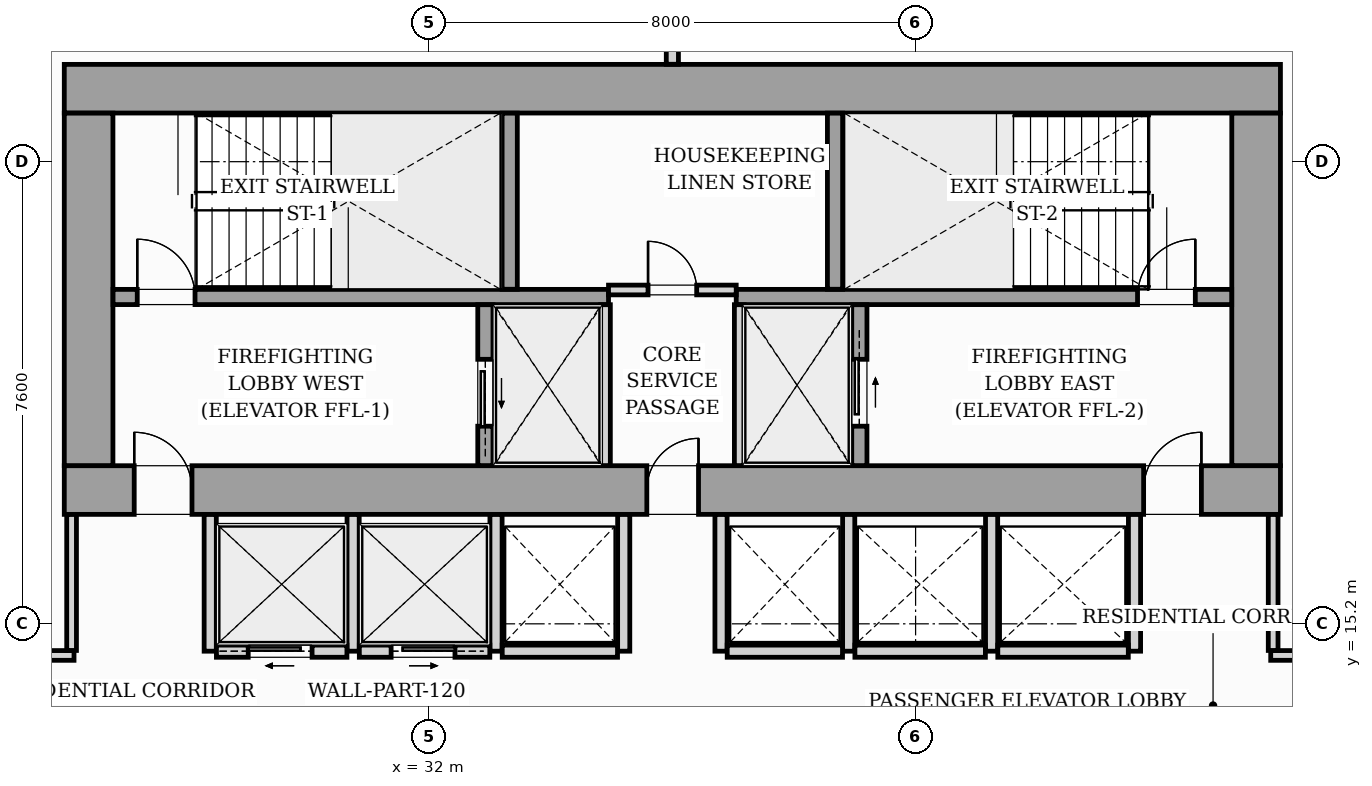
"""IFC4 building model, lengths in metres.
Left out: names, types, materials, properties, quantities, classifications, styles, units other than length and angle.
Written with IfcOpenShell. Run it as: python <this file> out.ifc"""

import sys

from ifc_helpers import new_model, si_unit, direction, frame, frame_2d, origin, origin_2d, place, context, subcontext, project, spatial, rectangle, i_section, extrude, source, transform, mapped, element, fill, save


model = new_model("IFC4")
c1 = context("Model", 3, precision=1e-05, world=origin(), true_north=direction((0.0, 1.0)))
c2 = subcontext(c1, "Body", "Model", "MODEL_VIEW")
j1 = project(units=[si_unit("LENGTHUNIT", "METRE"), si_unit("PLANEANGLEUNIT", "RADIAN")], contexts=[c1])
p1 = place(None, origin())
s1 = spatial("IfcSite", under=j1, at=p1, CompositionType="ELEMENT")
p2 = place(p1, origin())
s2 = spatial("IfcBuilding", under=s1, at=p2, CompositionType="ELEMENT")
p3 = place(p2, frame((0.0, 0.0, 51.8)))
s3 = spatial("IfcBuildingStorey", under=s2, at=p3, CompositionType="ELEMENT", Elevation=51.8)
m1 = source(origin(), c2, "Body", "SweptSolid", [
    extrude(i_section(OverallWidth=0.437, OverallDepth=0.514, WebThickness=0.061, FlangeThickness=0.097, FilletRadius=0.018, at=origin_2d()), origin(), (0.0, 0.0, 1.0), 3.196),
])
for number, where, z_axis, x_axis in (
    (1, (26.4, 17.4, 0.002), (0.0, 0.0, 1.0), (1.0, 0.0, 0.0)),
    (2, (33.12, 17.4, 0.002), (0.0, 0.0, 1.0), (1.0, 0.0, 0.0)),
    (3, (38.88, 17.4, 0.002), (0.0, 0.0, 1.0), (1.0, 0.0, 0.0)),
    (4, (45.6, 17.4, 0.002), (0.0, 0.0, 1.0), (1.0, 0.0, 0.0)),
    (5, (26.4, 24.0, 0.002), (0.0, 0.0, 1.0), (1.0, 0.0, 0.0)),
    (6, (33.12, 24.0, 0.002), (0.0, 0.0, 1.0), (1.0, 0.0, 0.0)),
    (7, (38.88, 24.0, 0.002), (0.0, 0.0, 1.0), (1.0, 0.0, 0.0)),
    (8, (45.6, 24.0, 0.002), (0.0, 0.0, 1.0), (1.0, 0.0, 0.0)),
):
    element("IfcColumn", number, at=place(p3, frame(where, z_axis=z_axis, x_axis=x_axis)), inside=s3, PredefinedType="PILASTER", context=c2, shape_type="MappedRepresentation", body=[
        mapped(m1, transform((0.0, 0.0, 0.0), scale=1.0)),
    ])
p4 = place(p3, frame((26.0, 17.4, 0.0), z_axis=(0.0, 0.0, 1.0), x_axis=(1.0, 0.0, 0.0)))
e9 = element("IfcWall", 9, at=p4, inside=s3, PredefinedType="SHEAR", context=c2, shape_type="SweptSolid", body=[
    extrude(rectangle(XDim=20.0, YDim=0.8, at=frame_2d((10.0, 0.0))), origin(), (0.0, 0.0, 1.0), 3.2),
])
p5 = place(p4, frame((1.15, 0.0, 0.0)))
e10 = element("IfcOpeningElement", 10, at=p5, cuts=e9, PredefinedType="OPENING", context=c2, shape_type="SweptSolid", body=[
    extrude(rectangle(XDim=0.95, YDim=2.06, at=frame_2d((0.475, 1.03))), frame((0.0, 0.41, 0.0), z_axis=(0.0, -1.0, 0.0), x_axis=(1.0, 0.0, 0.0)), (0.0, 0.0, 1.0), 0.82),
])
p6 = place(p4, frame((9.58, 0.0, 0.0)))
e11 = element("IfcOpeningElement", 11, at=p6, cuts=e9, PredefinedType="OPENING", context=c2, shape_type="SweptSolid", body=[
    extrude(rectangle(XDim=0.85, YDim=2.0, at=frame_2d((0.425, 1.0))), frame((0.0, 0.41, 0.0), z_axis=(0.0, -1.0, 0.0), x_axis=(1.0, 0.0, 0.0)), (0.0, 0.0, 1.0), 0.82),
])
p7 = place(p4, frame((17.75, 0.0, 0.0)))
e12 = element("IfcOpeningElement", 12, at=p7, cuts=e9, PredefinedType="OPENING", context=c2, shape_type="SweptSolid", body=[
    extrude(rectangle(XDim=0.95, YDim=2.06, at=frame_2d((0.475, 1.03))), frame((0.0, 0.41, 0.0), z_axis=(0.0, -1.0, 0.0), x_axis=(1.0, 0.0, 0.0)), (0.0, 0.0, 1.0), 0.82),
])
p8 = place(p3, frame((26.0, 24.0, 0.0), z_axis=(0.0, 0.0, 1.0), x_axis=(1.0, 0.0, 0.0)))
e13 = element("IfcWall", 13, at=p8, inside=s3, PredefinedType="SHEAR", context=c2, shape_type="SweptSolid", body=[
    extrude(rectangle(XDim=20.0, YDim=0.8, at=frame_2d((10.0, 0.0))), origin(), (0.0, 0.0, 1.0), 3.2),
])
for number, where, z_axis, x_axis in (
    (14, (26.4, 17.802, 0.0), (0.0, 0.0, 1.0), (0.0, 1.0, 0.0)),
    (15, (45.6, 17.802, 0.0), (0.0, 0.0, 1.0), (0.0, 1.0, 0.0)),
):
    element("IfcWall", number, at=place(p3, frame(where, z_axis=z_axis, x_axis=x_axis)), inside=s3, PredefinedType="SHEAR", context=c2, shape_type="SweptSolid", body=[
        extrude(rectangle(XDim=5.796, YDim=0.8, at=frame_2d((2.898, 0.0))), origin(), (0.0, 0.0, 1.0), 3.2),
    ])
p9 = place(p3, frame((26.802, 20.575, 0.0), z_axis=(0.0, 0.0, 1.0), x_axis=(1.0, 0.0, 0.0)))
e16 = element("IfcWall", 16, at=p9, inside=s3, PredefinedType="SOLIDWALL", context=c2, shape_type="SweptSolid", body=[
    extrude(rectangle(XDim=8.148, YDim=0.25, at=frame_2d((4.074, 0.0))), origin(), (0.0, 0.0, 1.0), 3.2),
])
p10 = place(p9, frame((0.398, 0.0, 0.0)))
e17 = element("IfcOpeningElement", 17, at=p10, cuts=e16, PredefinedType="OPENING", context=c2, shape_type="SweptSolid", body=[
    extrude(rectangle(XDim=0.95, YDim=2.06, at=frame_2d((0.475, 1.03))), frame((0.0, 0.135, 0.0), z_axis=(0.0, -1.0, 0.0), x_axis=(1.0, 0.0, 0.0)), (0.0, 0.0, 1.0), 0.27),
])
p11 = place(p3, frame((37.05, 20.575, 0.0), z_axis=(0.0, 0.0, 1.0), x_axis=(1.0, 0.0, 0.0)))
e18 = element("IfcWall", 18, at=p11, inside=s3, PredefinedType="SOLIDWALL", context=c2, shape_type="SweptSolid", body=[
    extrude(rectangle(XDim=8.148, YDim=0.25, at=frame_2d((4.074, 0.0))), origin(), (0.0, 0.0, 1.0), 3.2),
])
p12 = place(p11, frame((6.6, 0.0, 0.0)))
e19 = element("IfcOpeningElement", 19, at=p12, cuts=e18, PredefinedType="OPENING", context=c2, shape_type="SweptSolid", body=[
    extrude(rectangle(XDim=0.95, YDim=2.06, at=frame_2d((0.475, 1.03))), frame((0.0, 0.135, 0.0), z_axis=(0.0, -1.0, 0.0), x_axis=(1.0, 0.0, 0.0)), (0.0, 0.0, 1.0), 0.27),
])
for number, where, z_axis, x_axis in (
    (20, (33.325, 20.702, 0.0), (0.0, 0.0, 1.0), (0.0, 1.0, 0.0)),
    (21, (38.675, 20.702, 0.0), (0.0, 0.0, 1.0), (0.0, 1.0, 0.0)),
):
    element("IfcWall", number, at=place(p3, frame(where, z_axis=z_axis, x_axis=x_axis)), inside=s3, PredefinedType="SOLIDWALL", context=c2, shape_type="SweptSolid", body=[
        extrude(rectangle(XDim=2.896, YDim=0.25, at=frame_2d((1.448, 0.0))), origin(), (0.0, 0.0, 1.0), 3.2),
    ])
p13 = place(p3, frame((32.925, 17.802, 0.0), z_axis=(0.0, 0.0, 1.0), x_axis=(0.0, 1.0, 0.0)))
e22 = element("IfcWall", 22, at=p13, inside=s3, PredefinedType="SOLIDWALL", context=c2, shape_type="SweptSolid", body=[
    extrude(rectangle(XDim=2.646, YDim=0.25, at=frame_2d((1.323, 0.0))), origin(), (0.0, 0.0, 1.0), 3.2),
])
p14 = place(p13, frame((0.648, 0.0, 0.0)))
e23 = element("IfcOpeningElement", 23, at=p14, cuts=e22, PredefinedType="OPENING", context=c2, shape_type="SweptSolid", body=[
    extrude(rectangle(XDim=1.1, YDim=2.08, at=frame_2d((0.55, 1.04))), frame((0.0, 0.135, 0.0), z_axis=(0.0, -1.0, 0.0), x_axis=(1.0, 0.0, 0.0)), (0.0, 0.0, 1.0), 0.27),
])
for number, where, z_axis, x_axis in (
    (24, (34.9, 17.802, 0.0), (0.0, 0.0, 1.0), (0.0, 1.0, 0.0)),
    (25, (37.1, 17.802, 0.0), (0.0, 0.0, 1.0), (0.0, 1.0, 0.0)),
):
    element("IfcWall", number, at=place(p3, frame(where, z_axis=z_axis, x_axis=x_axis)), inside=s3, PredefinedType="PARTITIONING", context=c2, shape_type="SweptSolid", body=[
        extrude(rectangle(XDim=2.646, YDim=0.16, at=frame_2d((1.323, 0.0))), origin(), (0.0, 0.0, 1.0), 2.94),
    ])
p15 = place(p3, frame((39.075, 17.802, 0.0), z_axis=(0.0, 0.0, 1.0), x_axis=(0.0, 1.0, 0.0)))
e26 = element("IfcWall", 26, at=p15, inside=s3, PredefinedType="SOLIDWALL", context=c2, shape_type="SweptSolid", body=[
    extrude(rectangle(XDim=2.646, YDim=0.25, at=frame_2d((1.323, 0.0))), origin(), (0.0, 0.0, 1.0), 3.2),
])
p16 = place(p15, frame((0.648, 0.0, 0.0)))
e27 = element("IfcOpeningElement", 27, at=p16, cuts=e26, PredefinedType="OPENING", context=c2, shape_type="SweptSolid", body=[
    extrude(rectangle(XDim=1.1, YDim=2.08, at=frame_2d((0.55, 1.04))), frame((0.0, 0.135, 0.0), z_axis=(0.0, -1.0, 0.0), x_axis=(1.0, 0.0, 0.0)), (0.0, 0.0, 1.0), 0.27),
])
p17 = place(p3, frame((34.95, 20.69, 0.0), z_axis=(0.0, 0.0, 1.0), x_axis=(1.0, 0.0, 0.0)))
e28 = element("IfcWall", 28, at=p17, inside=s3, PredefinedType="PARTITIONING", context=c2, shape_type="SweptSolid", body=[
    extrude(rectangle(XDim=2.1, YDim=0.16, at=frame_2d((1.05, 0.0))), origin(), (0.0, 0.0, 1.0), 2.94),
])
p18 = place(p17, frame((0.65, 0.0, 0.0)))
e29 = element("IfcOpeningElement", 29, at=p18, cuts=e28, PredefinedType="OPENING", context=c2, shape_type="SweptSolid", body=[
    extrude(rectangle(XDim=0.8, YDim=2.05, at=frame_2d((0.4, 1.025))), frame((0.0, 0.09, 0.0), z_axis=(0.0, -1.0, 0.0), x_axis=(1.0, 0.0, 0.0)), (0.0, 0.0, 1.0), 0.18),
])
for number, where, z_axis, x_axis in (
    (30, (28.4, 14.75, 0.0), (0.0, 0.0, 1.0), (0.0, 1.0, 0.0)),
    (31, (30.75, 14.75, 0.0), (0.0, 0.0, 1.0), (0.0, 1.0, 0.0)),
    (32, (33.1, 14.75, 0.0), (0.0, 0.0, 1.0), (0.0, 1.0, 0.0)),
):
    element("IfcWall", number, at=place(p3, frame(where, z_axis=z_axis, x_axis=x_axis)), inside=s3, PredefinedType="PARTITIONING", context=c2, shape_type="SweptSolid", body=[
        extrude(rectangle(XDim=2.248, YDim=0.2, at=frame_2d((1.124, 0.0))), origin(), (0.0, 0.0, 1.0), 2.94),
    ])
p19 = place(p3, frame((28.502, 14.75, 0.0), z_axis=(0.0, 0.0, 1.0), x_axis=(1.0, 0.0, 0.0)))
e33 = element("IfcWall", 33, at=p19, inside=s3, PredefinedType="PARTITIONING", context=c2, shape_type="SweptSolid", body=[
    extrude(rectangle(XDim=2.146, YDim=0.2, at=frame_2d((1.073, 0.0))), origin(), (0.0, 0.0, 1.0), 2.94),
])
p20 = place(p19, frame((0.523, 0.0, 0.0)))
e34 = element("IfcOpeningElement", 34, at=p20, cuts=e33, PredefinedType="OPENING", context=c2, shape_type="SweptSolid", body=[
    extrude(rectangle(XDim=1.05, YDim=2.08, at=frame_2d((0.525, 1.04))), frame((0.0, 0.11, 0.0), z_axis=(0.0, -1.0, 0.0), x_axis=(1.0, 0.0, 0.0)), (0.0, 0.0, 1.0), 0.22),
])
p21 = place(p3, frame((30.852, 14.75, 0.0), z_axis=(0.0, 0.0, 1.0), x_axis=(1.0, 0.0, 0.0)))
e35 = element("IfcWall", 35, at=p21, inside=s3, PredefinedType="PARTITIONING", context=c2, shape_type="SweptSolid", body=[
    extrude(rectangle(XDim=2.146, YDim=0.2, at=frame_2d((1.073, 0.0))), origin(), (0.0, 0.0, 1.0), 2.94),
])
p22 = place(p21, frame((0.523, 0.0, 0.0)))
e36 = element("IfcOpeningElement", 36, at=p22, cuts=e35, PredefinedType="OPENING", context=c2, shape_type="SweptSolid", body=[
    extrude(rectangle(XDim=1.05, YDim=2.08, at=frame_2d((0.525, 1.04))), frame((0.0, 0.11, 0.0), z_axis=(0.0, -1.0, 0.0), x_axis=(1.0, 0.0, 0.0)), (0.0, 0.0, 1.0), 0.22),
])
p23 = place(p3, frame((35.2, 14.75, 0.0), z_axis=(0.0, 0.0, 1.0), x_axis=(0.0, 1.0, 0.0)))
e37 = element("IfcWall", 37, at=p23, inside=s3, PredefinedType="PARTITIONING", context=c2, shape_type="SweptSolid", body=[
    extrude(rectangle(XDim=2.248, YDim=0.2, at=frame_2d((1.124, 0.0))), origin(), (0.0, 0.0, 1.0), 2.94),
])
p24 = place(p3, frame((33.202, 14.75, 0.0), z_axis=(0.0, 0.0, 1.0), x_axis=(1.0, 0.0, 0.0)))
e38 = element("IfcWall", 38, at=p24, inside=s3, PredefinedType="PARTITIONING", context=c2, shape_type="SweptSolid", body=[
    extrude(rectangle(XDim=1.896, YDim=0.2, at=frame_2d((0.948, 0.0))), origin(), (0.0, 0.0, 1.0), 2.94),
])
for number, where, z_axis, x_axis in (
    (39, (36.8, 14.75, 0.0), (0.0, 0.0, 1.0), (0.0, 1.0, 0.0)),
    (40, (38.9, 14.75, 0.0), (0.0, 0.0, 1.0), (0.0, 1.0, 0.0)),
):
    element("IfcWall", number, at=place(p3, frame(where, z_axis=z_axis, x_axis=x_axis)), inside=s3, PredefinedType="PARTITIONING", context=c2, shape_type="SweptSolid", body=[
        extrude(rectangle(XDim=2.248, YDim=0.2, at=frame_2d((1.124, 0.0))), origin(), (0.0, 0.0, 1.0), 2.94),
    ])
p25 = place(p3, frame((36.902, 14.75, 0.0), z_axis=(0.0, 0.0, 1.0), x_axis=(1.0, 0.0, 0.0)))
e41 = element("IfcWall", 41, at=p25, inside=s3, PredefinedType="PARTITIONING", context=c2, shape_type="SweptSolid", body=[
    extrude(rectangle(XDim=1.896, YDim=0.2, at=frame_2d((0.948, 0.0))), origin(), (0.0, 0.0, 1.0), 2.94),
])
for number, where, z_axis, x_axis in (
    (42, (41.25, 14.75, 0.0), (0.0, 0.0, 1.0), (0.0, 1.0, 0.0)),
    (43, (43.6, 14.75, 0.0), (0.0, 0.0, 1.0), (0.0, 1.0, 0.0)),
):
    element("IfcWall", number, at=place(p3, frame(where, z_axis=z_axis, x_axis=x_axis)), inside=s3, PredefinedType="PARTITIONING", context=c2, shape_type="SweptSolid", body=[
        extrude(rectangle(XDim=2.248, YDim=0.2, at=frame_2d((1.124, 0.0))), origin(), (0.0, 0.0, 1.0), 2.94),
    ])
for number, where, z_axis, x_axis in (
    (44, (39.002, 14.75, 0.0), (0.0, 0.0, 1.0), (1.0, 0.0, 0.0)),
    (45, (41.352, 14.75, 0.0), (0.0, 0.0, 1.0), (1.0, 0.0, 0.0)),
):
    element("IfcWall", number, at=place(p3, frame(where, z_axis=z_axis, x_axis=x_axis)), inside=s3, PredefinedType="PARTITIONING", context=c2, shape_type="SweptSolid", body=[
        extrude(rectangle(XDim=2.146, YDim=0.2, at=frame_2d((1.073, 0.0))), origin(), (0.0, 0.0, 1.0), 2.94),
    ])
p26 = place(p3, frame((36.0, 24.402, 0.0), z_axis=(0.0, 0.0, 1.0), x_axis=(0.0, 1.0, 0.0)))
e46 = element("IfcWall", 46, at=p26, inside=s3, PredefinedType="PARTITIONING", context=c2, shape_type="SweptSolid", body=[
    extrude(rectangle(XDim=3.218, YDim=0.2, at=frame_2d((1.609, 0.0))), origin(), (0.0, 0.0, 1.0), 2.94),
])
p27 = place(p3, frame((16.382, 14.68, 0.0), z_axis=(0.0, 0.0, 1.0), x_axis=(1.0, 0.0, 0.0)))
e47 = element("IfcWall", 47, at=p27, inside=s3, PredefinedType="PARTITIONING", context=c2, shape_type="SweptSolid", body=[
    extrude(rectangle(XDim=9.778, YDim=0.16, at=frame_2d((4.889, 0.0))), origin(), (0.0, 0.0, 1.0), 2.94),
])
p28 = place(p27, frame((4.313, 0.0, 0.0)))
e48 = element("IfcOpeningElement", 48, at=p28, cuts=e47, PredefinedType="OPENING", context=c2, shape_type="SweptSolid", body=[
    extrude(rectangle(XDim=0.95, YDim=2.06, at=frame_2d((0.475, 1.03))), frame((0.0, 0.09, 0.0), z_axis=(0.0, -1.0, 0.0), x_axis=(1.0, 0.0, 0.0)), (0.0, 0.0, 1.0), 0.18),
])
p29 = place(p3, frame((26.12, 14.762, 0.0), z_axis=(0.0, 0.0, 1.0), x_axis=(0.0, 1.0, 0.0)))
e49 = element("IfcWall", 49, at=p29, inside=s3, PredefinedType="PARTITIONING", context=c2, shape_type="SweptSolid", body=[
    extrude(rectangle(XDim=2.236, YDim=0.16, at=frame_2d((1.118, 0.0))), origin(), (0.0, 0.0, 1.0), 2.94),
])
p30 = place(p3, frame((45.84, 14.68, 0.0), z_axis=(0.0, 0.0, 1.0), x_axis=(1.0, 0.0, 0.0)))
e50 = element("IfcWall", 50, at=p30, inside=s3, PredefinedType="PARTITIONING", context=c2, shape_type="SweptSolid", body=[
    extrude(rectangle(XDim=5.578, YDim=0.16, at=frame_2d((2.789, 0.0))), origin(), (0.0, 0.0, 1.0), 2.94),
])
p31 = place(p30, frame((2.415, 0.0, 0.0)))
e51 = element("IfcOpeningElement", 51, at=p31, cuts=e50, PredefinedType="OPENING", context=c2, shape_type="SweptSolid", body=[
    extrude(rectangle(XDim=0.95, YDim=2.06, at=frame_2d((0.475, 1.03))), frame((0.0, 0.09, 0.0), z_axis=(0.0, -1.0, 0.0), x_axis=(1.0, 0.0, 0.0)), (0.0, 0.0, 1.0), 0.18),
])
p32 = place(p3, frame((45.88, 14.762, 0.0), z_axis=(0.0, 0.0, 1.0), x_axis=(0.0, 1.0, 0.0)))
e52 = element("IfcWall", 52, at=p32, inside=s3, PredefinedType="PARTITIONING", context=c2, shape_type="SweptSolid", body=[
    extrude(rectangle(XDim=2.236, YDim=0.16, at=frame_2d((1.118, 0.0))), origin(), (0.0, 0.0, 1.0), 2.94),
])
m2 = source(origin(), c2, "Body", "SweptSolid", [
    extrude(rectangle(XDim=0.95, YDim=2.06, at=frame_2d((0.475, 1.03))), frame((0.0, 0.025, 0.0), z_axis=(0.0, -1.0, 0.0), x_axis=(1.0, 0.0, 0.0)), (0.0, 0.0, 1.0), 0.05),
])
p33 = place(p5, origin())
e53 = element("IfcDoor", 53, at=p33, inside=s3, OperationType="SINGLE_SWING_LEFT", PredefinedType="DOOR", context=c2, shape_type="MappedRepresentation", body=[
    mapped(m2, transform((0.0, 0.0, 0.0), scale=1.0)),
])
fill(e10, e53)
m3 = source(origin(), c2, "Body", "SweptSolid", [
    extrude(rectangle(XDim=0.85, YDim=2.0, at=frame_2d((0.425, 1.0))), frame((0.0, 0.025, 0.0), z_axis=(0.0, -1.0, 0.0), x_axis=(1.0, 0.0, 0.0)), (0.0, 0.0, 1.0), 0.05),
])
p34 = place(p6, origin())
e54 = element("IfcDoor", 54, at=p34, inside=s3, OperationType="SINGLE_SWING_RIGHT", PredefinedType="DOOR", context=c2, shape_type="MappedRepresentation", body=[
    mapped(m3, transform((0.0, 0.0, 0.0), scale=1.0)),
])
fill(e11, e54)
p35 = place(p7, origin())
e55 = element("IfcDoor", 55, at=p35, inside=s3, OperationType="SINGLE_SWING_RIGHT", PredefinedType="DOOR", context=c2, shape_type="MappedRepresentation", body=[
    mapped(m2, transform((0.0, 0.0, 0.0), scale=1.0)),
])
fill(e12, e55)
p36 = place(p10, origin())
e56 = element("IfcDoor", 56, at=p36, inside=s3, OperationType="SINGLE_SWING_LEFT", PredefinedType="DOOR", context=c2, shape_type="MappedRepresentation", body=[
    mapped(m2, transform((0.0, 0.0, 0.0), scale=1.0)),
])
fill(e17, e56)
p37 = place(p12, origin())
e57 = element("IfcDoor", 57, at=p37, inside=s3, OperationType="SINGLE_SWING_RIGHT", PredefinedType="DOOR", context=c2, shape_type="MappedRepresentation", body=[
    mapped(m2, transform((0.0, 0.0, 0.0), scale=1.0)),
])
fill(e19, e57)
m4 = source(origin(), c2, "Body", "SweptSolid", [
    extrude(rectangle(XDim=1.1, YDim=2.08, at=frame_2d((0.55, 1.04))), frame((0.0, 0.025, 0.0), z_axis=(0.0, -1.0, 0.0), x_axis=(1.0, 0.0, 0.0)), (0.0, 0.0, 1.0), 0.05),
])
p38 = place(p14, origin())
e58 = element("IfcDoor", 58, at=p38, inside=s3, OperationType="SLIDING_TO_LEFT", PredefinedType="DOOR", context=c2, shape_type="MappedRepresentation", body=[
    mapped(m4, transform((0.0, 0.0, 0.0), scale=1.0)),
])
fill(e23, e58)
p39 = place(p16, origin())
e59 = element("IfcDoor", 59, at=p39, inside=s3, OperationType="SLIDING_TO_RIGHT", PredefinedType="DOOR", context=c2, shape_type="MappedRepresentation", body=[
    mapped(m4, transform((0.0, 0.0, 0.0), scale=1.0)),
])
fill(e27, e59)
m5 = source(origin(), c2, "Body", "SweptSolid", [
    extrude(rectangle(XDim=0.8, YDim=2.05, at=frame_2d((0.4, 1.025))), frame((0.0, 0.025, 0.0), z_axis=(0.0, -1.0, 0.0), x_axis=(1.0, 0.0, 0.0)), (0.0, 0.0, 1.0), 0.05),
])
p40 = place(p18, origin())
e60 = element("IfcDoor", 60, at=p40, inside=s3, OperationType="SINGLE_SWING_LEFT", PredefinedType="DOOR", context=c2, shape_type="MappedRepresentation", body=[
    mapped(m5, transform((0.0, 0.0, 0.0), scale=1.0)),
])
fill(e29, e60)
m6 = source(origin(), c2, "Body", "SweptSolid", [
    extrude(rectangle(XDim=1.05, YDim=2.08, at=frame_2d((0.525, 1.04))), frame((0.0, 0.025, 0.0), z_axis=(0.0, -1.0, 0.0), x_axis=(1.0, 0.0, 0.0)), (0.0, 0.0, 1.0), 0.05),
])
p41 = place(p20, origin())
e61 = element("IfcDoor", 61, at=p41, inside=s3, OperationType="SLIDING_TO_LEFT", PredefinedType="DOOR", context=c2, shape_type="MappedRepresentation", body=[
    mapped(m6, transform((0.0, 0.0, 0.0), scale=1.0)),
])
fill(e34, e61)
p42 = place(p22, origin())
e62 = element("IfcDoor", 62, at=p42, inside=s3, OperationType="SLIDING_TO_RIGHT", PredefinedType="DOOR", context=c2, shape_type="MappedRepresentation", body=[
    mapped(m6, transform((0.0, 0.0, 0.0), scale=1.0)),
])
fill(e36, e62)
save(model, sys.argv[1])
